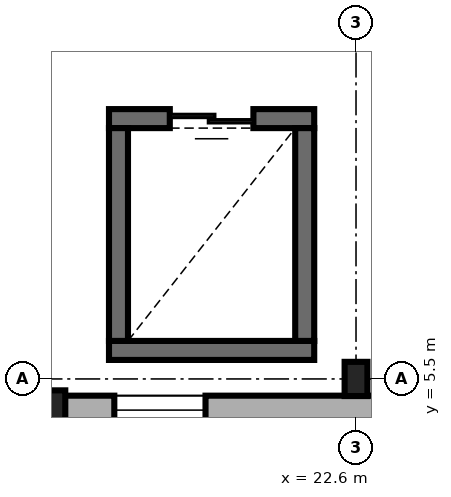
"""IFC4 building model, lengths in metres.
Left out: names, types, materials, properties, quantities, classifications, styles, units other than length and angle.
Written with IfcOpenShell. Run it as: python <this file> out.ifc"""

import sys

from ifc_helpers import new_model, si_unit, direction, frame, frame_2d, origin, origin_2d, place, context, subcontext, project, spatial, rectangle, i_section, extrude, element, fill, save


model = new_model("IFC4")
c1 = context("Model", 3, precision=1e-05, world=origin(), true_north=direction((0.0, 1.0)))
c2 = subcontext(c1, "Body", "Model", "MODEL_VIEW")
j1 = project(units=[si_unit("LENGTHUNIT", "METRE"), si_unit("PLANEANGLEUNIT", "RADIAN")], contexts=[c1])
p1 = place(None, origin())
s1 = spatial("IfcSite", under=j1, at=p1, CompositionType="ELEMENT")
p2 = place(p1, origin())
s2 = spatial("IfcBuilding", under=s1, at=p2, CompositionType="ELEMENT")
p3 = place(p2, origin())
s3 = spatial("IfcBuildingStorey", under=s2, at=p3, CompositionType="ELEMENT", Elevation=0.0)
p4 = place(p3, frame((18.6, 5.05, 0.0), z_axis=(0.0, 0.0, 1.0), x_axis=(1.0, 0.0, 0.0)))
e1 = element("IfcColumn", 1, at=p4, inside=s3, PredefinedType="PILASTER", context=c2, shape_type="SweptSolid", body=[
    extrude(rectangle(XDim=0.35, YDim=0.6, at=origin_2d()), origin(), (0.0, 0.0, 1.0), 4.8),
])
p5 = place(p3, frame((22.6, 5.5, 0.0), z_axis=(0.0, 0.0, 1.0), x_axis=(1.0, 0.0, 0.0)))
e2 = element("IfcColumn", 2, at=p5, inside=s3, PredefinedType="COLUMN", context=c2, shape_type="SweptSolid", body=[
    extrude(i_section(OverallWidth=0.3, OverallDepth=0.45, WebThickness=0.014, FlangeThickness=0.026, FilletRadius=0.027, at=origin_2d()), origin(), (0.0, 0.0, 1.0), 4.8),
])
p6 = place(p3, frame((19.35, 5.875, 0.0), z_axis=(0.0, 0.0, 1.0), x_axis=(1.0, 0.0, 0.0)))
e3 = element("IfcWall", 3, at=p6, inside=s3, PredefinedType="SHEAR", context=c2, shape_type="SweptSolid", body=[
    extrude(rectangle(XDim=2.7, YDim=0.25, at=frame_2d((1.35, 0.0))), origin(), (0.0, 0.0, 1.0), 4.8),
])
p7 = place(p3, frame((22.05, 8.925, 0.0), z_axis=(0.0, 0.0, 1.0), x_axis=(-1.0, 0.0, 0.0)))
e4 = element("IfcWall", 4, at=p7, inside=s3, PredefinedType="SHEAR", context=c2, shape_type="SweptSolid", body=[
    extrude(rectangle(XDim=2.7, YDim=0.25, at=frame_2d((1.35, 0.0))), origin(), (0.0, 0.0, 1.0), 4.8),
])
p8 = place(p7, frame((0.8, 0.0, 0.0)))
e5 = element("IfcOpeningElement", 5, at=p8, cuts=e4, PredefinedType="OPENING", context=c2, shape_type="SweptSolid", body=[
    extrude(rectangle(XDim=1.1, YDim=2.15, at=frame_2d((0.55, 1.075))), frame((0.0, 0.135, 0.0), z_axis=(0.0, -1.0, 0.0), x_axis=(1.0, 0.0, 0.0)), (0.0, 0.0, 1.0), 0.27),
])
for number, where, z_axis, x_axis in (
    (6, (19.475, 8.8, 0.0), (0.0, 0.0, 1.0), (0.0, -1.0, 0.0)),
    (7, (21.925, 6.0, 0.0), (0.0, 0.0, 1.0), (0.0, 1.0, 0.0)),
):
    element("IfcWall", number, at=place(p3, frame(where, z_axis=z_axis, x_axis=x_axis)), inside=s3, PredefinedType="SHEAR", context=c2, shape_type="SweptSolid", body=[
        extrude(rectangle(XDim=2.8, YDim=0.25, at=frame_2d((1.4, 0.0))), origin(), (0.0, 0.0, 1.0), 4.8),
    ])
p9 = place(p3, frame((5.962, 5.09, 0.0), z_axis=(0.0, 0.0, 1.0), x_axis=(1.0, 0.0, 0.0)))
e8 = element("IfcWall", 8, at=p9, inside=s3, PredefinedType="SOLIDWALL", context=c2, shape_type="SweptSolid", body=[
    extrude(rectangle(XDim=48.176, YDim=0.38, at=frame_2d((24.088, 0.0))), origin(), (0.0, 0.0, 1.0), 4.55),
])
p10 = place(p9, frame((10.614, 0.0, 0.9)))
e9 = element("IfcOpeningElement", 9, at=p10, cuts=e8, PredefinedType="OPENING", context=c2, shape_type="SweptSolid", body=[
    extrude(rectangle(XDim=1.2, YDim=1.8, at=frame_2d((0.6, 0.9))), frame((0.0, 0.2, 0.0), z_axis=(0.0, -1.0, 0.0), x_axis=(1.0, 0.0, 0.0)), (0.0, 0.0, 1.0), 0.4),
])
p11 = place(p9, frame((13.458, 0.0, 0.9)))
e10 = element("IfcOpeningElement", 10, at=p11, cuts=e8, PredefinedType="OPENING", context=c2, shape_type="SweptSolid", body=[
    extrude(rectangle(XDim=1.2, YDim=1.8, at=frame_2d((0.6, 0.9))), frame((0.0, 0.2, 0.0), z_axis=(0.0, -1.0, 0.0), x_axis=(1.0, 0.0, 0.0)), (0.0, 0.0, 1.0), 0.4),
])
p12 = place(p9, frame((29.438, 0.0, 0.9)))
e11 = element("IfcOpeningElement", 11, at=p12, cuts=e8, PredefinedType="OPENING", context=c2, shape_type="SweptSolid", body=[
    extrude(rectangle(XDim=2.4, YDim=1.8, at=frame_2d((1.2, 0.9))), frame((0.0, 0.2, 0.0), z_axis=(0.0, -1.0, 0.0), x_axis=(1.0, 0.0, 0.0)), (0.0, 0.0, 1.0), 0.4),
])
p13 = place(p9, frame((33.738, 0.0, 0.9)))
e12 = element("IfcOpeningElement", 12, at=p13, cuts=e8, PredefinedType="OPENING", context=c2, shape_type="SweptSolid", body=[
    extrude(rectangle(XDim=1.8, YDim=2.1, at=frame_2d((0.9, 1.05))), frame((0.0, 0.2, 0.0), z_axis=(0.0, -1.0, 0.0), x_axis=(1.0, 0.0, 0.0)), (0.0, 0.0, 1.0), 0.4),
])
p14 = place(p9, frame((37.258, 0.0, 0.9)))
e13 = element("IfcOpeningElement", 13, at=p14, cuts=e8, PredefinedType="OPENING", context=c2, shape_type="SweptSolid", body=[
    extrude(rectangle(XDim=0.9, YDim=1.8, at=frame_2d((0.45, 0.9))), frame((0.0, 0.2, 0.0), z_axis=(0.0, -1.0, 0.0), x_axis=(1.0, 0.0, 0.0)), (0.0, 0.0, 1.0), 0.4),
])
p15 = place(p9, frame((39.018, 0.0, 0.9)))
e14 = element("IfcOpeningElement", 14, at=p15, cuts=e8, PredefinedType="OPENING", context=c2, shape_type="SweptSolid", body=[
    extrude(rectangle(XDim=0.9, YDim=1.8, at=frame_2d((0.45, 0.9))), frame((0.0, 0.2, 0.0), z_axis=(0.0, -1.0, 0.0), x_axis=(1.0, 0.0, 0.0)), (0.0, 0.0, 1.0), 0.4),
])
p16 = place(p9, frame((41.538, 0.0, 0.9)))
e15 = element("IfcOpeningElement", 15, at=p16, cuts=e8, PredefinedType="OPENING", context=c2, shape_type="SweptSolid", body=[
    extrude(rectangle(XDim=1.2, YDim=1.8, at=frame_2d((0.6, 0.9))), frame((0.0, 0.2, 0.0), z_axis=(0.0, -1.0, 0.0), x_axis=(1.0, 0.0, 0.0)), (0.0, 0.0, 1.0), 0.4),
])
p17 = place(p9, frame((44.538, 0.0, 0.9)))
e16 = element("IfcOpeningElement", 16, at=p17, cuts=e8, PredefinedType="OPENING", context=c2, shape_type="SweptSolid", body=[
    extrude(rectangle(XDim=1.2, YDim=1.5, at=frame_2d((0.6, 0.75))), frame((0.0, 0.2, 0.0), z_axis=(0.0, -1.0, 0.0), x_axis=(1.0, 0.0, 0.0)), (0.0, 0.0, 1.0), 0.4),
])
p18 = place(p8, origin())
e17 = element("IfcDoor", 17, at=p18, inside=s3, OperationType="DOUBLE_DOOR_SLIDING", PredefinedType="DOOR", context=c2, shape_type="SweptSolid", body=[
    extrude(rectangle(XDim=1.1, YDim=2.15, at=frame_2d((0.55, 1.075))), frame((0.0, 0.025, 0.0), z_axis=(0.0, -1.0, 0.0), x_axis=(1.0, 0.0, 0.0)), (0.0, 0.0, 1.0), 0.05),
])
fill(e5, e17)
p19 = place(p11, origin())
e18 = element("IfcWindow", 18, at=p19, inside=s3, PartitioningType="SINGLE_PANEL", PredefinedType="WINDOW", context=c2, shape_type="SweptSolid", body=[
    extrude(rectangle(XDim=1.2, YDim=1.8, at=frame_2d((0.6, 0.9))), frame((0.0, 0.03, 0.0), z_axis=(0.0, -1.0, 0.0), x_axis=(1.0, 0.0, 0.0)), (0.0, 0.0, 1.0), 0.06),
])
fill(e10, e18)
save(model, sys.argv[1])
